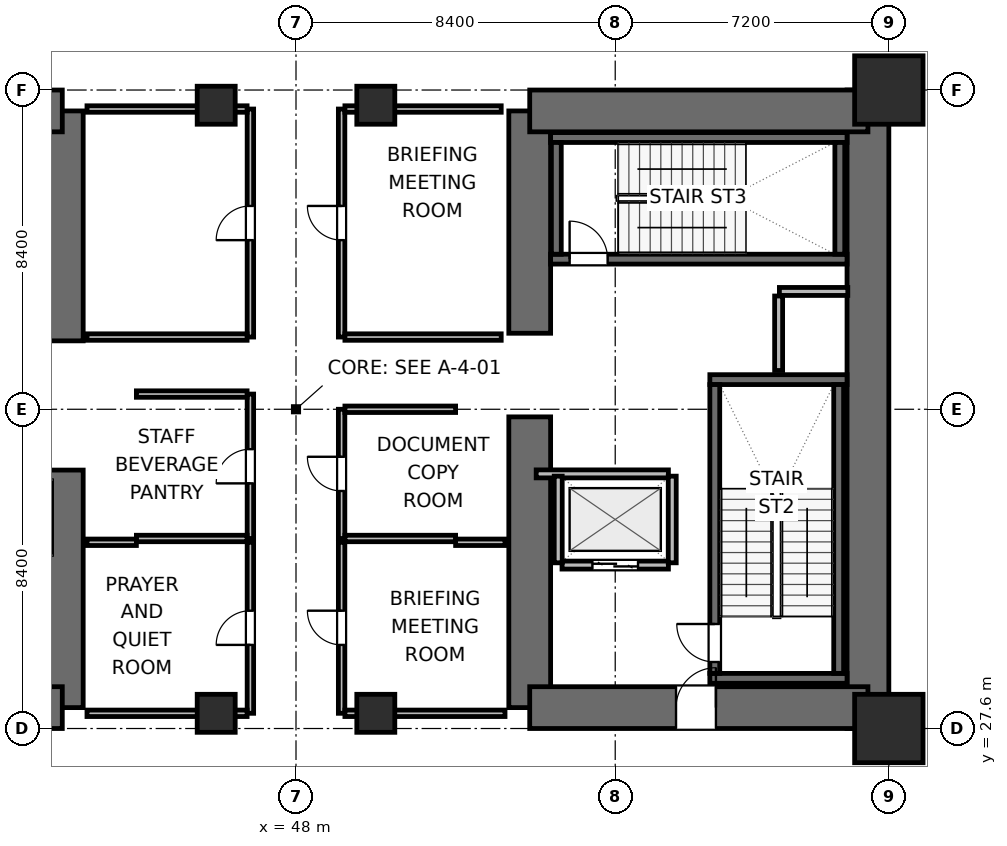
"""IFC4 building model, lengths in metres.
Left out: names, types, materials, properties, quantities, classifications, styles, units other than length and angle.
Written with IfcOpenShell. Run it as: python <this file> out.ifc"""

import sys

from ifc_helpers import new_model, si_unit, direction, frame, frame_2d, origin, origin_2d, place, context, subcontext, project, spatial, rectangle, extrude, element, fill, save


model = new_model("IFC4")
c1 = context("Model", 3, precision=1e-05, world=origin(), true_north=direction((0.0, 1.0)))
c2 = subcontext(c1, "Body", "Model", "MODEL_VIEW")
j1 = project(units=[si_unit("LENGTHUNIT", "METRE"), si_unit("PLANEANGLEUNIT", "RADIAN")], contexts=[c1])
p1 = place(None, origin())
s1 = spatial("IfcSite", under=j1, at=p1, CompositionType="ELEMENT")
p2 = place(p1, origin())
s2 = spatial("IfcBuilding", under=s1, at=p2, CompositionType="ELEMENT")
p3 = place(p2, frame((0.0, 0.0, -4.5)))
s3 = spatial("IfcBuildingStorey", under=s2, at=p3, CompositionType="ELEMENT", Elevation=-4.5)
p4 = place(p3, frame((41.85, 28.15, 0.0), z_axis=(0.0, 0.0, 1.0), x_axis=(0.0, 1.0, 0.0)))
e1 = element("IfcWall", 1, at=p4, inside=s3, PredefinedType="SHEAR", context=c2, shape_type="SweptSolid", body=[
    extrude(rectangle(XDim=6.25, YDim=1.1, at=frame_2d((3.125, 0.0))), origin(), (0.0, 0.0, 1.0), 4.5),
])
p5 = place(p3, frame((41.85, 37.8, 0.0), z_axis=(0.0, 0.0, 1.0), x_axis=(0.0, 1.0, 0.0)))
e2 = element("IfcWall", 2, at=p5, inside=s3, PredefinedType="SHEAR", context=c2, shape_type="SweptSolid", body=[
    extrude(rectangle(XDim=6.05, YDim=1.1, at=frame_2d((3.025, 0.0))), origin(), (0.0, 0.0, 1.0), 4.5),
])
p6 = place(p3, frame((32.95, 28.15, 0.0), z_axis=(0.0, 0.0, 1.0), x_axis=(1.0, 0.0, 0.0)))
e3 = element("IfcWall", 3, at=p6, inside=s3, PredefinedType="SHEAR", context=c2, shape_type="SweptSolid", body=[
    extrude(rectangle(XDim=8.9, YDim=1.1, at=frame_2d((4.45, 0.0))), origin(), (0.0, 0.0, 1.0), 4.5),
])
p7 = place(p6, frame((4.9, 0.0, 0.0)))
e4 = element("IfcOpeningElement", 4, at=p7, cuts=e3, PredefinedType="OPENING", context=c2, shape_type="SweptSolid", body=[
    extrude(rectangle(XDim=1.05, YDim=2.04, at=frame_2d((0.525, 1.02))), frame((0.0, 0.56, 0.0), z_axis=(0.0, -1.0, 0.0), x_axis=(1.0, 0.0, 0.0)), (0.0, 0.0, 1.0), 1.12),
])
p8 = place(p3, frame((32.95, 43.85, 0.0), z_axis=(0.0, 0.0, 1.0), x_axis=(1.0, 0.0, 0.0)))
e5 = element("IfcWall", 5, at=p8, inside=s3, PredefinedType="SHEAR", context=c2, shape_type="SweptSolid", body=[
    extrude(rectangle(XDim=8.9, YDim=1.1, at=frame_2d((4.45, 0.0))), origin(), (0.0, 0.0, 1.0), 4.5),
])
p9 = place(p3, frame((54.15, 28.15, 0.0), z_axis=(0.0, 0.0, 1.0), x_axis=(0.0, 1.0, 0.0)))
e6 = element("IfcWall", 6, at=p9, inside=s3, PredefinedType="SHEAR", context=c2, shape_type="SweptSolid", body=[
    extrude(rectangle(XDim=7.65, YDim=1.1, at=frame_2d((3.825, 0.0))), origin(), (0.0, 0.0, 1.0), 4.5),
])
p10 = place(p3, frame((54.15, 38.0, 0.0), z_axis=(0.0, 0.0, 1.0), x_axis=(0.0, 1.0, 0.0)))
e7 = element("IfcWall", 7, at=p10, inside=s3, PredefinedType="SHEAR", context=c2, shape_type="SweptSolid", body=[
    extrude(rectangle(XDim=5.85, YDim=1.1, at=frame_2d((2.925, 0.0))), origin(), (0.0, 0.0, 1.0), 4.5),
])
p11 = place(p3, frame((63.05, 27.6, 0.0), z_axis=(0.0, 0.0, 1.0), x_axis=(0.0, 1.0, 0.0)))
e8 = element("IfcWall", 8, at=p11, inside=s3, PredefinedType="SHEAR", context=c2, shape_type="SweptSolid", body=[
    extrude(rectangle(XDim=16.8, YDim=1.1, at=frame_2d((8.4, 0.0))), origin(), (0.0, 0.0, 1.0), 4.5),
])
p12 = place(p3, frame((54.15, 28.15, 0.0), z_axis=(0.0, 0.0, 1.0), x_axis=(1.0, 0.0, 0.0)))
e9 = element("IfcWall", 9, at=p12, inside=s3, PredefinedType="SHEAR", context=c2, shape_type="SweptSolid", body=[
    extrude(rectangle(XDim=8.9, YDim=1.1, at=frame_2d((4.45, 0.0))), origin(), (0.0, 0.0, 1.0), 4.5),
])
p13 = place(p12, frame((3.85, 0.0, 0.0)))
e10 = element("IfcOpeningElement", 10, at=p13, cuts=e9, PredefinedType="OPENING", context=c2, shape_type="SweptSolid", body=[
    extrude(rectangle(XDim=1.05, YDim=2.04, at=frame_2d((0.525, 1.02))), frame((0.0, 0.56, 0.0), z_axis=(0.0, -1.0, 0.0), x_axis=(1.0, 0.0, 0.0)), (0.0, 0.0, 1.0), 1.12),
])
p14 = place(p3, frame((54.15, 43.85, 0.0), z_axis=(0.0, 0.0, 1.0), x_axis=(1.0, 0.0, 0.0)))
e11 = element("IfcWall", 11, at=p14, inside=s3, PredefinedType="SHEAR", context=c2, shape_type="SweptSolid", body=[
    extrude(rectangle(XDim=8.9, YDim=1.1, at=frame_2d((4.45, 0.0))), origin(), (0.0, 0.0, 1.0), 4.5),
])
for number, where, z_axis, x_axis in (
    (12, (58.89, 28.92, 0.0), (0.0, 0.0, 1.0), (1.0, 0.0, 0.0)),
    (13, (58.89, 36.78, 0.0), (0.0, 0.0, 1.0), (1.0, 0.0, 0.0)),
):
    element("IfcWall", number, at=place(p3, frame(where, z_axis=z_axis, x_axis=x_axis)), inside=s3, PredefinedType="SHEAR", context=c2, shape_type="SweptSolid", body=[
        extrude(rectangle(XDim=3.61, YDim=0.26, at=frame_2d((1.805, 0.0))), origin(), (0.0, 0.0, 1.0), 4.5),
    ])
p15 = place(p3, frame((59.02, 29.05, 0.0), z_axis=(0.0, 0.0, 1.0), x_axis=(0.0, 1.0, 0.0)))
e14 = element("IfcWall", 14, at=p15, inside=s3, PredefinedType="SHEAR", context=c2, shape_type="SweptSolid", body=[
    extrude(rectangle(XDim=7.6, YDim=0.26, at=frame_2d((3.8, 0.0))), origin(), (0.0, 0.0, 1.0), 4.5),
])
p16 = place(p15, frame((0.3, 0.0, 0.0)))
e15 = element("IfcOpeningElement", 15, at=p16, cuts=e14, PredefinedType="OPENING", context=c2, shape_type="SweptSolid", body=[
    extrude(rectangle(XDim=1.0, YDim=2.04, at=frame_2d((0.5, 1.02))), frame((0.0, 0.14, 0.0), z_axis=(0.0, -1.0, 0.0), x_axis=(1.0, 0.0, 0.0)), (0.0, 0.0, 1.0), 0.28),
])
p17 = place(p3, frame((62.28, 29.05, 0.0), z_axis=(0.0, 0.0, 1.0), x_axis=(0.0, 1.0, 0.0)))
e16 = element("IfcWall", 16, at=p17, inside=s3, PredefinedType="SHEAR", context=c2, shape_type="SweptSolid", body=[
    extrude(rectangle(XDim=7.6, YDim=0.26, at=frame_2d((3.8, 0.0))), origin(), (0.0, 0.0, 1.0), 4.5),
])
p18 = place(p3, frame((54.7, 39.95, 0.0), z_axis=(0.0, 0.0, 1.0), x_axis=(1.0, 0.0, 0.0)))
e17 = element("IfcWall", 17, at=p18, inside=s3, PredefinedType="SHEAR", context=c2, shape_type="SweptSolid", body=[
    extrude(rectangle(XDim=7.8, YDim=0.26, at=frame_2d((3.9, 0.0))), origin(), (0.0, 0.0, 1.0), 4.5),
])
p19 = place(p18, frame((0.5, 0.0, 0.0)))
e18 = element("IfcOpeningElement", 18, at=p19, cuts=e17, PredefinedType="OPENING", context=c2, shape_type="SweptSolid", body=[
    extrude(rectangle(XDim=1.0, YDim=2.04, at=frame_2d((0.5, 1.02))), frame((0.0, 0.14, 0.0), z_axis=(0.0, -1.0, 0.0), x_axis=(1.0, 0.0, 0.0)), (0.0, 0.0, 1.0), 0.28),
])
p20 = place(p3, frame((54.7, 43.15, 0.0), z_axis=(0.0, 0.0, 1.0), x_axis=(1.0, 0.0, 0.0)))
e19 = element("IfcWall", 19, at=p20, inside=s3, PredefinedType="SHEAR", context=c2, shape_type="SweptSolid", body=[
    extrude(rectangle(XDim=7.8, YDim=0.26, at=frame_2d((3.9, 0.0))), origin(), (0.0, 0.0, 1.0), 4.5),
])
for number, where, z_axis, x_axis in (
    (20, (54.85, 40.08, 0.0), (0.0, 0.0, 1.0), (0.0, 1.0, 0.0)),
    (21, (62.31, 40.08, 0.0), (0.0, 0.0, 1.0), (0.0, 1.0, 0.0)),
):
    element("IfcWall", number, at=place(p3, frame(where, z_axis=z_axis, x_axis=x_axis)), inside=s3, PredefinedType="SHEAR", context=c2, shape_type="SweptSolid", body=[
        extrude(rectangle(XDim=2.94, YDim=0.26, at=frame_2d((1.47, 0.0))), origin(), (0.0, 0.0, 1.0), 4.5),
    ])
for number, where, z_axis, x_axis in (
    (22, (63.6, 27.6, 0.0), (0.0, 0.0, 1.0), (1.0, 0.0, 0.0)),
    (23, (63.6, 44.4, 0.0), (0.0, 0.0, 1.0), (1.0, 0.0, 0.0)),
):
    element("IfcColumn", number, at=place(p3, frame(where, z_axis=z_axis, x_axis=x_axis)), inside=s3, PredefinedType="COLUMN", context=c2, shape_type="SweptSolid", body=[
        extrude(rectangle(XDim=1.8, YDim=1.8, at=origin_2d()), origin(), (0.0, 0.0, 1.0), 4.5),
    ])
for number, where, z_axis, x_axis in (
    (24, (45.9, 28.0, 0.0), (0.0, 0.0, 1.0), (1.0, 0.0, 0.0)),
    (25, (50.1, 28.0, 0.0), (0.0, 0.0, 1.0), (1.0, 0.0, 0.0)),
    (26, (45.9, 44.0, 0.0), (0.0, 0.0, 1.0), (1.0, 0.0, 0.0)),
    (27, (50.1, 44.0, 0.0), (0.0, 0.0, 1.0), (1.0, 0.0, 0.0)),
):
    element("IfcColumn", number, at=place(p3, frame(where, z_axis=z_axis, x_axis=x_axis)), inside=s3, PredefinedType="COLUMN", context=c2, shape_type="SweptSolid", body=[
        extrude(rectangle(XDim=1.0, YDim=1.0, at=origin_2d()), origin(), (0.0, 0.0, 1.0), 4.5),
    ])
p21 = place(p3, frame((60.72, 39.1, 0.0), z_axis=(0.0, 0.0, 1.0), x_axis=(1.0, 0.0, 0.0)))
e28 = element("IfcWall", 28, at=p21, inside=s3, PredefinedType="PARTITIONING", context=c2, shape_type="SweptSolid", body=[
    extrude(rectangle(XDim=1.8, YDim=0.21, at=frame_2d((0.9, 0.0))), origin(), (0.0, 0.0, 1.0), 4.18),
])
p22 = place(p3, frame((60.7, 37.02, 0.0), z_axis=(0.0, 0.0, 1.0), x_axis=(0.0, 1.0, 0.0)))
e29 = element("IfcWall", 29, at=p22, inside=s3, PredefinedType="PARTITIONING", context=c2, shape_type="SweptSolid", body=[
    extrude(rectangle(XDim=1.96, YDim=0.21, at=frame_2d((0.98, 0.0))), origin(), (0.0, 0.0, 1.0), 4.18),
])
p23 = place(p3, frame((55.0, 31.9, 0.0), z_axis=(0.0, 0.0, 1.0), x_axis=(1.0, 0.0, 0.0)))
e30 = element("IfcWall", 30, at=p23, inside=s3, PredefinedType="PARTITIONING", context=c2, shape_type="SweptSolid", body=[
    extrude(rectangle(XDim=2.8, YDim=0.21, at=frame_2d((1.4, 0.0))), origin(), (0.0, 0.0, 1.0), 4.18),
])
p24 = place(p23, frame((0.8, 0.0, 0.0)))
e31 = element("IfcOpeningElement", 31, at=p24, cuts=e30, PredefinedType="OPENING", context=c2, shape_type="SweptSolid", body=[
    extrude(rectangle(XDim=1.2, YDim=2.04, at=frame_2d((0.6, 1.02))), frame((0.0, 0.115, 0.0), z_axis=(0.0, -1.0, 0.0), x_axis=(1.0, 0.0, 0.0)), (0.0, 0.0, 1.0), 0.23),
])
p25 = place(p3, frame((54.32, 34.3, 0.0), z_axis=(0.0, 0.0, 1.0), x_axis=(1.0, 0.0, 0.0)))
e32 = element("IfcWall", 32, at=p25, inside=s3, PredefinedType="PARTITIONING", context=c2, shape_type="SweptSolid", body=[
    extrude(rectangle(XDim=3.48, YDim=0.21, at=frame_2d((1.74, 0.0))), origin(), (0.0, 0.0, 1.0), 4.18),
])
for number, where, z_axis, x_axis in (
    (33, (54.9, 31.96, 0.0), (0.0, 0.0, 1.0), (0.0, 1.0, 0.0)),
    (34, (57.9, 31.96, 0.0), (0.0, 0.0, 1.0), (0.0, 1.0, 0.0)),
):
    element("IfcWall", number, at=place(p3, frame(where, z_axis=z_axis, x_axis=x_axis)), inside=s3, PredefinedType="PARTITIONING", context=c2, shape_type="SweptSolid", body=[
        extrude(rectangle(XDim=2.28, YDim=0.21, at=frame_2d((1.14, 0.0))), origin(), (0.0, 0.0, 1.0), 4.18),
    ])
p26 = place(p3, frame((46.8, 32.6, 0.0), z_axis=(0.0, 0.0, 1.0), x_axis=(0.0, 1.0, 0.0)))
e35 = element("IfcWall", 35, at=p26, inside=s3, PredefinedType="PARTITIONING", context=c2, shape_type="SweptSolid", body=[
    extrude(rectangle(XDim=3.8, YDim=0.17, at=frame_2d((1.9, 0.0))), origin(), (0.0, 0.0, 1.0), 4.18),
])
p27 = place(p26, frame((1.45, 0.0, 0.0)))
e36 = element("IfcOpeningElement", 36, at=p27, cuts=e35, PredefinedType="OPENING", context=c2, shape_type="SweptSolid", body=[
    extrude(rectangle(XDim=0.9, YDim=2.02, at=frame_2d((0.45, 1.01))), frame((0.0, 0.095, 0.0), z_axis=(0.0, -1.0, 0.0), x_axis=(1.0, 0.0, 0.0)), (0.0, 0.0, 1.0), 0.19),
])
for number, where, z_axis, x_axis in (
    (37, (43.8, 32.6, 0.0), (0.0, 0.0, 1.0), (1.0, 0.0, 0.0)),
    (38, (43.8, 36.4, 0.0), (0.0, 0.0, 1.0), (1.0, 0.0, 0.0)),
):
    element("IfcWall", number, at=place(p3, frame(where, z_axis=z_axis, x_axis=x_axis)), inside=s3, PredefinedType="PARTITIONING", context=c2, shape_type="SweptSolid", body=[
        extrude(rectangle(XDim=2.913, YDim=0.17, at=frame_2d((1.457, 0.0))), origin(), (0.0, 0.0, 1.0), 4.18),
    ])
p28 = place(p3, frame((49.2, 32.6, 0.0), z_axis=(0.0, 0.0, 1.0), x_axis=(0.0, 1.0, 0.0)))
e39 = element("IfcWall", 39, at=p28, inside=s3, PredefinedType="PARTITIONING", context=c2, shape_type="SweptSolid", body=[
    extrude(rectangle(XDim=3.4, YDim=0.17, at=frame_2d((1.7, 0.0))), origin(), (0.0, 0.0, 1.0), 4.18),
])
p29 = place(p28, frame((1.25, 0.0, 0.0)))
e40 = element("IfcOpeningElement", 40, at=p29, cuts=e39, PredefinedType="OPENING", context=c2, shape_type="SweptSolid", body=[
    extrude(rectangle(XDim=0.9, YDim=2.02, at=frame_2d((0.45, 1.01))), frame((0.0, 0.095, 0.0), z_axis=(0.0, -1.0, 0.0), x_axis=(1.0, 0.0, 0.0)), (0.0, 0.0, 1.0), 0.19),
])
for number, where, z_axis, x_axis in (
    (41, (49.287, 32.6, 0.0), (0.0, 0.0, 1.0), (1.0, 0.0, 0.0)),
    (42, (49.287, 36.0, 0.0), (0.0, 0.0, 1.0), (1.0, 0.0, 0.0)),
):
    element("IfcWall", number, at=place(p3, frame(where, z_axis=z_axis, x_axis=x_axis)), inside=s3, PredefinedType="PARTITIONING", context=c2, shape_type="SweptSolid", body=[
        extrude(rectangle(XDim=2.913, YDim=0.17, at=frame_2d((1.457, 0.0))), origin(), (0.0, 0.0, 1.0), 4.18),
    ])
p30 = place(p3, frame((46.8, 28.0, 0.0), z_axis=(0.0, 0.0, 1.0), x_axis=(0.0, 1.0, 0.0)))
e43 = element("IfcWall", 43, at=p30, inside=s3, PredefinedType="PARTITIONING", context=c2, shape_type="SweptSolid", body=[
    extrude(rectangle(XDim=4.5, YDim=0.17, at=frame_2d((2.25, 0.0))), origin(), (0.0, 0.0, 1.0), 4.18),
])
p31 = place(p30, frame((1.8, 0.0, 0.0)))
e44 = element("IfcOpeningElement", 44, at=p31, cuts=e43, PredefinedType="OPENING", context=c2, shape_type="SweptSolid", body=[
    extrude(rectangle(XDim=0.9, YDim=2.02, at=frame_2d((0.45, 1.01))), frame((0.0, 0.095, 0.0), z_axis=(0.0, -1.0, 0.0), x_axis=(1.0, 0.0, 0.0)), (0.0, 0.0, 1.0), 0.19),
])
p32 = place(p3, frame((42.5, 28.0, 0.0), z_axis=(0.0, 0.0, 1.0), x_axis=(1.0, 0.0, 0.0)))
e45 = element("IfcWall", 45, at=p32, inside=s3, PredefinedType="PARTITIONING", context=c2, shape_type="SweptSolid", body=[
    extrude(rectangle(XDim=4.213, YDim=0.17, at=frame_2d((2.106, 0.0))), origin(), (0.0, 0.0, 1.0), 3.065),
])
p33 = place(p3, frame((42.5, 32.5, 0.0), z_axis=(0.0, 0.0, 1.0), x_axis=(1.0, 0.0, 0.0)))
e46 = element("IfcWall", 46, at=p33, inside=s3, PredefinedType="PARTITIONING", context=c2, shape_type="SweptSolid", body=[
    extrude(rectangle(XDim=1.3, YDim=0.17, at=frame_2d((0.65, 0.0))), origin(), (0.0, 0.0, 1.0), 4.18),
])
p34 = place(p3, frame((49.2, 28.0, 0.0), z_axis=(0.0, 0.0, 1.0), x_axis=(0.0, 1.0, 0.0)))
e47 = element("IfcWall", 47, at=p34, inside=s3, PredefinedType="PARTITIONING", context=c2, shape_type="SweptSolid", body=[
    extrude(rectangle(XDim=4.5, YDim=0.17, at=frame_2d((2.25, 0.0))), origin(), (0.0, 0.0, 1.0), 4.18),
])
p35 = place(p34, frame((1.8, 0.0, 0.0)))
e48 = element("IfcOpeningElement", 48, at=p35, cuts=e47, PredefinedType="OPENING", context=c2, shape_type="SweptSolid", body=[
    extrude(rectangle(XDim=0.9, YDim=2.02, at=frame_2d((0.45, 1.01))), frame((0.0, 0.095, 0.0), z_axis=(0.0, -1.0, 0.0), x_axis=(1.0, 0.0, 0.0)), (0.0, 0.0, 1.0), 0.19),
])
p36 = place(p3, frame((49.287, 28.0, 0.0), z_axis=(0.0, 0.0, 1.0), x_axis=(1.0, 0.0, 0.0)))
e49 = element("IfcWall", 49, at=p36, inside=s3, PredefinedType="PARTITIONING", context=c2, shape_type="SweptSolid", body=[
    extrude(rectangle(XDim=4.213, YDim=0.17, at=frame_2d((2.106, 0.0))), origin(), (0.0, 0.0, 1.0), 3.065),
])
p37 = place(p3, frame((52.2, 32.5, 0.0), z_axis=(0.0, 0.0, 1.0), x_axis=(1.0, 0.0, 0.0)))
e50 = element("IfcWall", 50, at=p37, inside=s3, PredefinedType="PARTITIONING", context=c2, shape_type="SweptSolid", body=[
    extrude(rectangle(XDim=1.3, YDim=0.17, at=frame_2d((0.65, 0.0))), origin(), (0.0, 0.0, 1.0), 4.18),
])
p38 = place(p3, frame((46.8, 37.9, 0.0), z_axis=(0.0, 0.0, 1.0), x_axis=(0.0, 1.0, 0.0)))
e51 = element("IfcWall", 51, at=p38, inside=s3, PredefinedType="PARTITIONING", context=c2, shape_type="SweptSolid", body=[
    extrude(rectangle(XDim=6.0, YDim=0.17, at=frame_2d((3.0, 0.0))), origin(), (0.0, 0.0, 1.0), 4.18),
])
p39 = place(p38, frame((2.55, 0.0, 0.0)))
e52 = element("IfcOpeningElement", 52, at=p39, cuts=e51, PredefinedType="OPENING", context=c2, shape_type="SweptSolid", body=[
    extrude(rectangle(XDim=0.9, YDim=2.02, at=frame_2d((0.45, 1.01))), frame((0.0, 0.095, 0.0), z_axis=(0.0, -1.0, 0.0), x_axis=(1.0, 0.0, 0.0)), (0.0, 0.0, 1.0), 0.19),
])
p40 = place(p3, frame((42.5, 37.9, 0.0), z_axis=(0.0, 0.0, 1.0), x_axis=(1.0, 0.0, 0.0)))
e53 = element("IfcWall", 53, at=p40, inside=s3, PredefinedType="PARTITIONING", context=c2, shape_type="SweptSolid", body=[
    extrude(rectangle(XDim=4.213, YDim=0.17, at=frame_2d((2.106, 0.0))), origin(), (0.0, 0.0, 1.0), 4.18),
])
p41 = place(p3, frame((42.5, 43.9, 0.0), z_axis=(0.0, 0.0, 1.0), x_axis=(1.0, 0.0, 0.0)))
e54 = element("IfcWall", 54, at=p41, inside=s3, PredefinedType="PARTITIONING", context=c2, shape_type="SweptSolid", body=[
    extrude(rectangle(XDim=4.213, YDim=0.17, at=frame_2d((2.106, 0.0))), origin(), (0.0, 0.0, 1.0), 3.065),
])
p42 = place(p3, frame((49.2, 37.9, 0.0), z_axis=(0.0, 0.0, 1.0), x_axis=(0.0, 1.0, 0.0)))
e55 = element("IfcWall", 55, at=p42, inside=s3, PredefinedType="PARTITIONING", context=c2, shape_type="SweptSolid", body=[
    extrude(rectangle(XDim=6.0, YDim=0.17, at=frame_2d((3.0, 0.0))), origin(), (0.0, 0.0, 1.0), 4.18),
])
p43 = place(p42, frame((2.55, 0.0, 0.0)))
e56 = element("IfcOpeningElement", 56, at=p43, cuts=e55, PredefinedType="OPENING", context=c2, shape_type="SweptSolid", body=[
    extrude(rectangle(XDim=0.9, YDim=2.02, at=frame_2d((0.45, 1.01))), frame((0.0, 0.095, 0.0), z_axis=(0.0, -1.0, 0.0), x_axis=(1.0, 0.0, 0.0)), (0.0, 0.0, 1.0), 0.19),
])
p44 = place(p3, frame((49.287, 37.9, 0.0), z_axis=(0.0, 0.0, 1.0), x_axis=(1.0, 0.0, 0.0)))
e57 = element("IfcWall", 57, at=p44, inside=s3, PredefinedType="PARTITIONING", context=c2, shape_type="SweptSolid", body=[
    extrude(rectangle(XDim=4.113, YDim=0.17, at=frame_2d((2.056, 0.0))), origin(), (0.0, 0.0, 1.0), 4.18),
])
p45 = place(p3, frame((49.287, 43.9, 0.0), z_axis=(0.0, 0.0, 1.0), x_axis=(1.0, 0.0, 0.0)))
e58 = element("IfcWall", 58, at=p45, inside=s3, PredefinedType="PARTITIONING", context=c2, shape_type="SweptSolid", body=[
    extrude(rectangle(XDim=4.113, YDim=0.17, at=frame_2d((2.056, 0.0))), origin(), (0.0, 0.0, 1.0), 3.065),
])
p46 = place(p16, origin())
e59 = element("IfcDoor", 59, at=p46, inside=s3, OperationType="SINGLE_SWING_RIGHT", PredefinedType="DOOR", context=c2, shape_type="SweptSolid", body=[
    extrude(rectangle(XDim=1.0, YDim=2.04, at=frame_2d((0.5, 1.02))), frame((0.0, 0.025, 0.0), z_axis=(0.0, -1.0, 0.0), x_axis=(1.0, 0.0, 0.0)), (0.0, 0.0, 1.0), 0.05),
])
fill(e15, e59)
p47 = place(p19, origin())
e60 = element("IfcDoor", 60, at=p47, inside=s3, OperationType="SINGLE_SWING_LEFT", PredefinedType="DOOR", context=c2, shape_type="SweptSolid", body=[
    extrude(rectangle(XDim=1.0, YDim=2.04, at=frame_2d((0.5, 1.02))), frame((0.0, 0.025, 0.0), z_axis=(0.0, -1.0, 0.0), x_axis=(1.0, 0.0, 0.0)), (0.0, 0.0, 1.0), 0.05),
])
fill(e18, e60)
p48 = place(p24, origin())
e61 = element("IfcDoor", 61, at=p48, inside=s3, OperationType="DOUBLE_DOOR_SLIDING", PredefinedType="DOOR", context=c2, shape_type="SweptSolid", body=[
    extrude(rectangle(XDim=1.2, YDim=2.04, at=frame_2d((0.6, 1.02))), frame((0.0, 0.025, 0.0), z_axis=(0.0, -1.0, 0.0), x_axis=(1.0, 0.0, 0.0)), (0.0, 0.0, 1.0), 0.05),
])
fill(e31, e61)
p49 = place(p13, origin())
e62 = element("IfcDoor", 62, at=p49, inside=s3, OperationType="SINGLE_SWING_RIGHT", PredefinedType="DOOR", context=c2, shape_type="SweptSolid", body=[
    extrude(rectangle(XDim=1.05, YDim=2.04, at=frame_2d((0.525, 1.02))), frame((0.0, 0.025, 0.0), z_axis=(0.0, -1.0, 0.0), x_axis=(1.0, 0.0, 0.0)), (0.0, 0.0, 1.0), 0.05),
])
fill(e10, e62)
p50 = place(p27, origin())
e63 = element("IfcDoor", 63, at=p50, inside=s3, OperationType="SINGLE_SWING_LEFT", PredefinedType="DOOR", context=c2, shape_type="SweptSolid", body=[
    extrude(rectangle(XDim=0.9, YDim=2.02, at=frame_2d((0.45, 1.01))), frame((0.0, 0.025, 0.0), z_axis=(0.0, -1.0, 0.0), x_axis=(1.0, 0.0, 0.0)), (0.0, 0.0, 1.0), 0.05),
])
fill(e36, e63)
p51 = place(p29, origin())
e64 = element("IfcDoor", 64, at=p51, inside=s3, OperationType="SINGLE_SWING_RIGHT", PredefinedType="DOOR", context=c2, shape_type="SweptSolid", body=[
    extrude(rectangle(XDim=0.9, YDim=2.02, at=frame_2d((0.45, 1.01))), frame((0.0, 0.025, 0.0), z_axis=(0.0, -1.0, 0.0), x_axis=(1.0, 0.0, 0.0)), (0.0, 0.0, 1.0), 0.05),
])
fill(e40, e64)
p52 = place(p31, origin())
e65 = element("IfcDoor", 65, at=p52, inside=s3, OperationType="SINGLE_SWING_LEFT", PredefinedType="DOOR", context=c2, shape_type="SweptSolid", body=[
    extrude(rectangle(XDim=0.9, YDim=2.02, at=frame_2d((0.45, 1.01))), frame((0.0, 0.025, 0.0), z_axis=(0.0, -1.0, 0.0), x_axis=(1.0, 0.0, 0.0)), (0.0, 0.0, 1.0), 0.05),
])
fill(e44, e65)
p53 = place(p35, origin())
e66 = element("IfcDoor", 66, at=p53, inside=s3, OperationType="SINGLE_SWING_RIGHT", PredefinedType="DOOR", context=c2, shape_type="SweptSolid", body=[
    extrude(rectangle(XDim=0.9, YDim=2.02, at=frame_2d((0.45, 1.01))), frame((0.0, 0.025, 0.0), z_axis=(0.0, -1.0, 0.0), x_axis=(1.0, 0.0, 0.0)), (0.0, 0.0, 1.0), 0.05),
])
fill(e48, e66)
p54 = place(p39, origin())
e67 = element("IfcDoor", 67, at=p54, inside=s3, OperationType="SINGLE_SWING_LEFT", PredefinedType="DOOR", context=c2, shape_type="SweptSolid", body=[
    extrude(rectangle(XDim=0.9, YDim=2.02, at=frame_2d((0.45, 1.01))), frame((0.0, 0.025, 0.0), z_axis=(0.0, -1.0, 0.0), x_axis=(1.0, 0.0, 0.0)), (0.0, 0.0, 1.0), 0.05),
])
fill(e52, e67)
p55 = place(p43, origin())
e68 = element("IfcDoor", 68, at=p55, inside=s3, OperationType="SINGLE_SWING_RIGHT", PredefinedType="DOOR", context=c2, shape_type="SweptSolid", body=[
    extrude(rectangle(XDim=0.9, YDim=2.02, at=frame_2d((0.45, 1.01))), frame((0.0, 0.025, 0.0), z_axis=(0.0, -1.0, 0.0), x_axis=(1.0, 0.0, 0.0)), (0.0, 0.0, 1.0), 0.05),
])
fill(e56, e68)
save(model, sys.argv[1])
